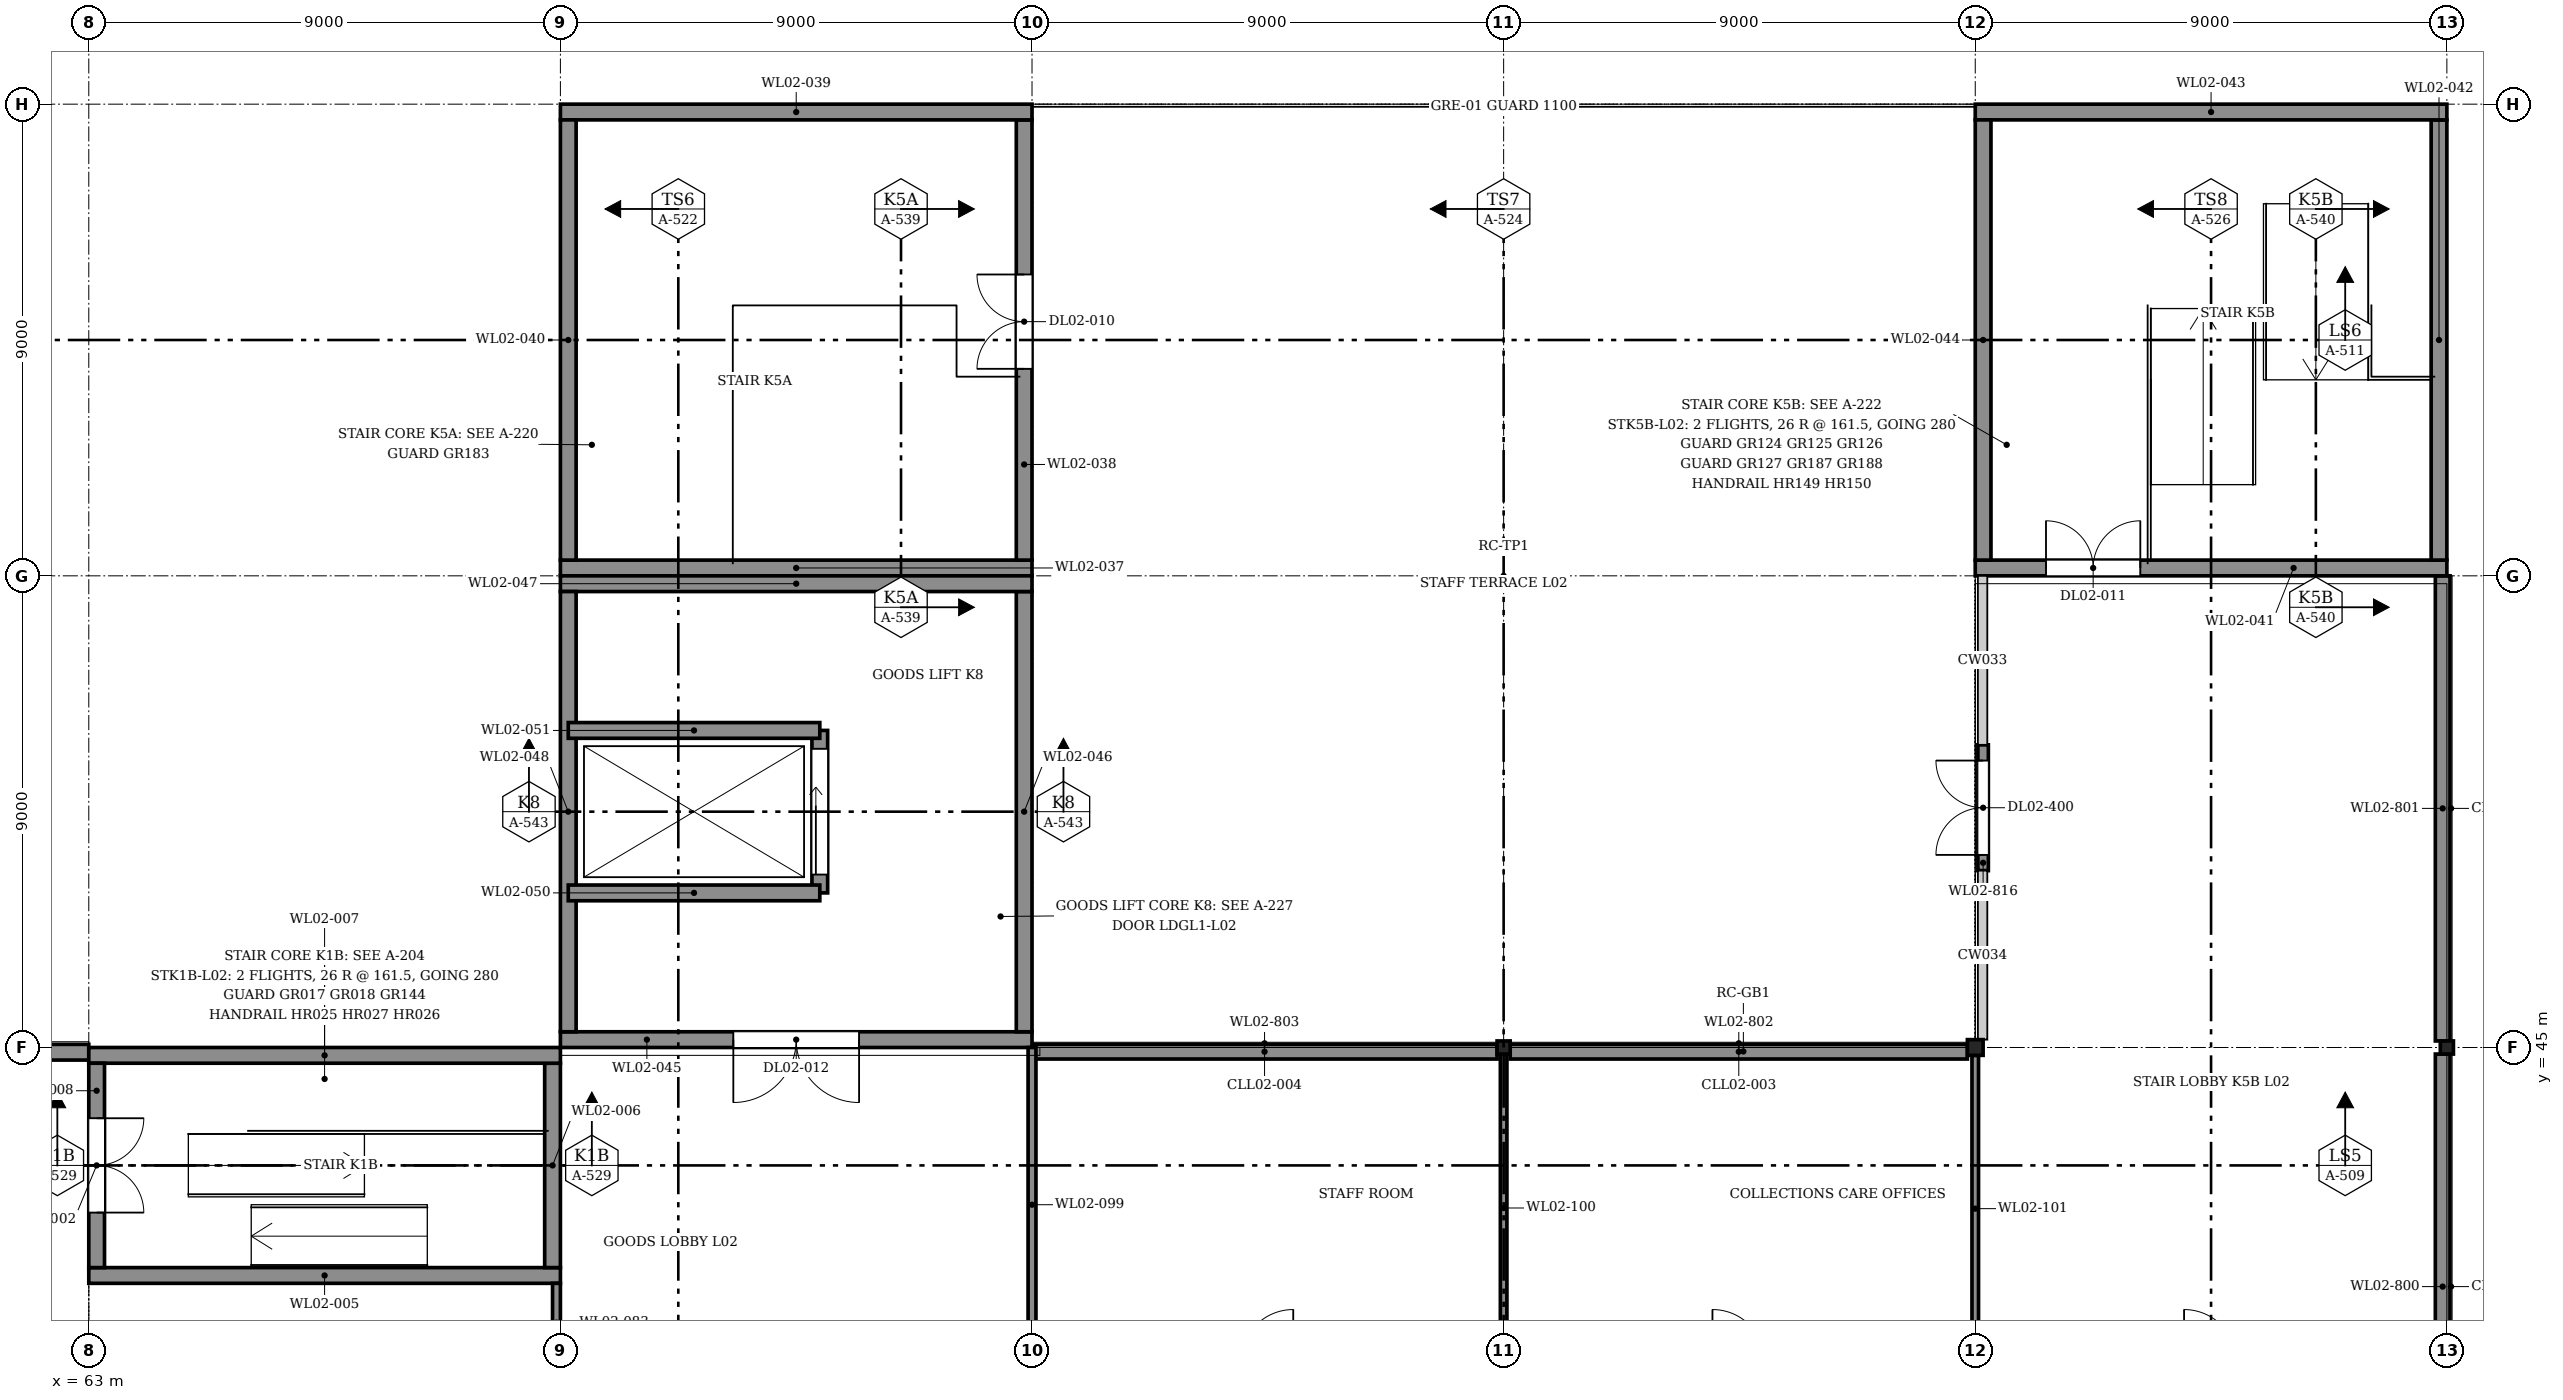
"""IFC4 building model, lengths in metres.
Left out: names, types, materials, properties, quantities, classifications, styles, units other than length and angle.
Written with IfcOpenShell. Run it as: python <this file> out.ifc"""

import sys

from ifc_helpers import new_model, si_unit, direction, frame, frame_2d, origin, origin_2d, place, context, subcontext, project, spatial, rectangle, hollow_rectangle, extrude, element, fill, save


model = new_model("IFC4")
c1 = context("Model", 3, precision=1e-05, world=origin(), true_north=direction((0.0, 1.0)))
c2 = subcontext(c1, "Body", "Model", "MODEL_VIEW")
j1 = project(units=[si_unit("LENGTHUNIT", "METRE"), si_unit("PLANEANGLEUNIT", "RADIAN")], contexts=[c1])
p1 = place(None, origin())
s1 = spatial("IfcSite", under=j1, at=p1, CompositionType="ELEMENT")
p2 = place(p1, origin())
s2 = spatial("IfcBuilding", under=s1, at=p2, CompositionType="ELEMENT")
p3 = place(p2, frame((0.0, 0.0, 9.2)))
s3 = spatial("IfcBuildingStorey", under=s2, at=p3, CompositionType="ELEMENT", Elevation=9.2)
p4 = place(p3, frame((90.0, 45.0, 0.0), z_axis=(0.0, 0.0, 1.0), x_axis=(1.0, 0.0, 0.0)))
e1 = element("IfcColumn", 1, at=p4, inside=s3, PredefinedType="COLUMN", context=c2, shape_type="SweptSolid", body=[
    extrude(hollow_rectangle(XDim=0.25, YDim=0.25, WallThickness=0.01, InnerFilletRadius=0.015, OuterFilletRadius=0.025, at=origin_2d()), origin(), (0.0, 0.0, 1.0), 3.7),
])
p5 = place(p3, frame((99.0, 45.0, 0.0), z_axis=(0.0, 0.0, 1.0), x_axis=(1.0, 0.0, 0.0)))
e2 = element("IfcColumn", 2, at=p5, inside=s3, PredefinedType="COLUMN", context=c2, shape_type="SweptSolid", body=[
    extrude(hollow_rectangle(XDim=0.3, YDim=0.3, WallThickness=0.01, InnerFilletRadius=0.015, OuterFilletRadius=0.025, at=origin_2d()), origin(), (0.0, 0.0, 1.0), 3.7),
])
p6 = place(p3, frame((108.0, 45.0, 0.0), z_axis=(0.0, 0.0, 1.0), x_axis=(1.0, 0.0, 0.0)))
e3 = element("IfcColumn", 3, at=p6, inside=s3, PredefinedType="COLUMN", context=c2, shape_type="SweptSolid", body=[
    extrude(hollow_rectangle(XDim=0.25, YDim=0.25, WallThickness=0.01, InnerFilletRadius=0.015, OuterFilletRadius=0.025, at=origin_2d()), origin(), (0.0, 0.0, 1.0), 3.7),
])
for number, where, z_axis, x_axis in (
    (4, (107.92, 36.0, 0.0), (0.0, 0.0, 1.0), (0.0, 1.0, 0.0)),
    (5, (107.92, 45.125, 0.0), (0.0, 0.0, 1.0), (0.0, 1.0, 0.0)),
):
    element("IfcWall", number, at=place(p3, frame(where, z_axis=z_axis, x_axis=x_axis)), inside=s3, PredefinedType="SOLIDWALL", context=c2, shape_type="SweptSolid", body=[
        extrude(rectangle(XDim=8.875, YDim=0.28, at=frame_2d((4.438, 0.0))), origin(), (0.0, 0.0, 1.0), 2.75),
    ])
p7 = place(p3, frame((90.125, 44.92, 0.0), z_axis=(0.0, 0.0, 1.0), x_axis=(1.0, 0.0, 0.0)))
e6 = element("IfcWall", 6, at=p7, inside=s3, PredefinedType="SOLIDWALL", context=c2, shape_type="SweptSolid", body=[
    extrude(rectangle(XDim=8.725, YDim=0.28, at=frame_2d((4.363, 0.0))), origin(), (0.0, 0.0, 1.0), 2.75),
])
p8 = place(p3, frame((81.0, 44.92, 0.0), z_axis=(0.0, 0.0, 1.0), x_axis=(1.0, 0.0, 0.0)))
e7 = element("IfcWall", 7, at=p8, inside=s3, PredefinedType="SOLIDWALL", context=c2, shape_type="SweptSolid", body=[
    extrude(rectangle(XDim=8.875, YDim=0.28, at=frame_2d((4.438, 0.0))), origin(), (0.0, 0.0, 1.0), 2.75),
])
p9 = place(p3, frame((54.25, 44.91, 0.0), z_axis=(0.0, 0.0, 1.0), x_axis=(1.0, 0.0, 0.0)))
e8 = element("IfcWall", 8, at=p9, inside=s3, PredefinedType="SOLIDWALL", context=c2, shape_type="SweptSolid", body=[
    extrude(rectangle(XDim=8.75, YDim=0.3, at=frame_2d((4.375, 0.0))), origin(), (0.0, 0.0, 1.0), 3.578),
])
p10 = place(p3, frame((99.15, 48.375, 0.0), z_axis=(0.0, 0.0, 1.0), x_axis=(0.0, 1.0, 0.0)))
e9 = element("IfcWall", 9, at=p10, inside=s3, PredefinedType="SOLIDWALL", context=c2, shape_type="SweptSolid", body=[
    extrude(rectangle(XDim=2.4, YDim=0.2, at=frame_2d((1.2, 0.0))), origin(), (0.0, 0.0, 1.0), 3.45),
])
p11 = place(p10, frame((0.3, 0.0, 0.0)))
e10 = element("IfcOpeningElement", 10, at=p11, cuts=e9, PredefinedType="OPENING", context=c2, shape_type="SweptSolid", body=[
    extrude(rectangle(XDim=1.8, YDim=2.4, at=frame_2d((0.9, 1.2))), frame((0.0, 0.11, 0.0), z_axis=(0.0, -1.0, 0.0), x_axis=(1.0, 0.0, 0.0)), (0.0, 0.0, 1.0), 0.22),
])
p12 = place(p3, frame((81.3, 44.875, 3.7), z_axis=(0.0, 0.0, 1.0), x_axis=(1.0, 0.0, 0.0)))
e11 = element("IfcWall", 11, at=p12, inside=s3, PredefinedType="PARAPET", context=c2, shape_type="SweptSolid", body=[
    extrude(rectangle(XDim=17.7, YDim=0.25, at=frame_2d((8.85, 0.0))), origin(), (0.0, 0.0, 1.0), 1.6),
])
for number, where, z_axis, x_axis in (
    (12, (99.125, 45.125, 3.7), (0.0, 0.0, 1.0), (0.0, 1.0, 0.0)),
    (13, (107.875, 45.125, 3.7), (0.0, 0.0, 1.0), (0.0, 1.0, 0.0)),
    (14, (107.875, 36.3, 3.7), (0.0, 0.0, 1.0), (0.0, 1.0, 0.0)),
):
    element("IfcWall", number, at=place(p3, frame(where, z_axis=z_axis, x_axis=x_axis)), inside=s3, PredefinedType="PARAPET", context=c2, shape_type="SweptSolid", body=[
        extrude(rectangle(XDim=8.575, YDim=0.25, at=frame_2d((4.288, 0.0))), origin(), (0.0, 0.0, 1.0), 1.6),
    ])
p13 = place(p3, frame((63.0, 40.65, 0.0), z_axis=(0.0, 0.0, 1.0), x_axis=(1.0, 0.0, 0.0)))
e15 = element("IfcWall", 15, at=p13, inside=s3, PredefinedType="SOLIDWALL", context=c2, shape_type="SweptSolid", body=[
    extrude(rectangle(XDim=9.0, YDim=0.3, at=frame_2d((4.5, 0.0))), origin(), (0.0, 0.0, 1.0), 4.2),
])
p14 = place(p3, frame((71.85, 40.8, 0.0), z_axis=(0.0, 0.0, 1.0), x_axis=(0.0, 1.0, 0.0)))
e16 = element("IfcWall", 16, at=p14, inside=s3, PredefinedType="SOLIDWALL", context=c2, shape_type="SweptSolid", body=[
    extrude(rectangle(XDim=3.9, YDim=0.3, at=frame_2d((1.95, 0.0))), origin(), (0.0, 0.0, 1.0), 4.2),
])
p15 = place(p3, frame((63.0, 44.85, 0.0), z_axis=(0.0, 0.0, 1.0), x_axis=(1.0, 0.0, 0.0)))
e17 = element("IfcWall", 17, at=p15, inside=s3, PredefinedType="SOLIDWALL", context=c2, shape_type="SweptSolid", body=[
    extrude(rectangle(XDim=9.0, YDim=0.3, at=frame_2d((4.5, 0.0))), origin(), (0.0, 0.0, 1.0), 4.2),
])
p16 = place(p3, frame((63.15, 40.8, 0.0), z_axis=(0.0, 0.0, 1.0), x_axis=(0.0, 1.0, 0.0)))
e18 = element("IfcWall", 18, at=p16, inside=s3, PredefinedType="SOLIDWALL", context=c2, shape_type="SweptSolid", body=[
    extrude(rectangle(XDim=3.9, YDim=0.3, at=frame_2d((1.95, 0.0))), origin(), (0.0, 0.0, 1.0), 4.2),
])
p17 = place(p16, frame((1.05, 0.0, 0.0)))
e19 = element("IfcOpeningElement", 19, at=p17, cuts=e18, PredefinedType="OPENING", context=c2, shape_type="SweptSolid", body=[
    extrude(rectangle(XDim=1.8, YDim=2.1, at=frame_2d((0.9, 1.05))), frame((0.0, 0.16, 0.0), z_axis=(0.0, -1.0, 0.0), x_axis=(1.0, 0.0, 0.0)), (0.0, 0.0, 1.0), 0.32),
])
p18 = place(p3, frame((72.0, 54.15, 0.0), z_axis=(0.0, 0.0, 1.0), x_axis=(1.0, 0.0, 0.0)))
e20 = element("IfcWall", 20, at=p18, inside=s3, PredefinedType="SOLIDWALL", context=c2, shape_type="SweptSolid", body=[
    extrude(rectangle(XDim=9.0, YDim=0.3, at=frame_2d((4.5, 0.0))), origin(), (0.0, 0.0, 1.0), 3.7),
])
p19 = place(p3, frame((80.85, 54.3, 0.0), z_axis=(0.0, 0.0, 1.0), x_axis=(0.0, 1.0, 0.0)))
e21 = element("IfcWall", 21, at=p19, inside=s3, PredefinedType="SOLIDWALL", context=c2, shape_type="SweptSolid", body=[
    extrude(rectangle(XDim=8.4, YDim=0.3, at=frame_2d((4.2, 0.0))), origin(), (0.0, 0.0, 1.0), 3.7),
])
p20 = place(p19, frame((3.65, 0.0, 0.0)))
e22 = element("IfcOpeningElement", 22, at=p20, cuts=e21, PredefinedType="OPENING", context=c2, shape_type="SweptSolid", body=[
    extrude(rectangle(XDim=1.8, YDim=2.1, at=frame_2d((0.9, 1.05))), frame((0.0, 0.16, 0.0), z_axis=(0.0, -1.0, 0.0), x_axis=(1.0, 0.0, 0.0)), (0.0, 0.0, 1.0), 0.32),
])
p21 = place(p3, frame((72.0, 62.85, 0.0), z_axis=(0.0, 0.0, 1.0), x_axis=(1.0, 0.0, 0.0)))
e23 = element("IfcWall", 23, at=p21, inside=s3, PredefinedType="SOLIDWALL", context=c2, shape_type="SweptSolid", body=[
    extrude(rectangle(XDim=9.0, YDim=0.3, at=frame_2d((4.5, 0.0))), origin(), (0.0, 0.0, 1.0), 3.7),
])
p22 = place(p3, frame((72.15, 54.3, 0.0), z_axis=(0.0, 0.0, 1.0), x_axis=(0.0, 1.0, 0.0)))
e24 = element("IfcWall", 24, at=p22, inside=s3, PredefinedType="SOLIDWALL", context=c2, shape_type="SweptSolid", body=[
    extrude(rectangle(XDim=8.4, YDim=0.3, at=frame_2d((4.2, 0.0))), origin(), (0.0, 0.0, 1.0), 3.7),
])
p23 = place(p3, frame((99.0, 54.15, 0.0), z_axis=(0.0, 0.0, 1.0), x_axis=(1.0, 0.0, 0.0)))
e25 = element("IfcWall", 25, at=p23, inside=s3, PredefinedType="SOLIDWALL", context=c2, shape_type="SweptSolid", body=[
    extrude(rectangle(XDim=9.0, YDim=0.3, at=frame_2d((4.5, 0.0))), origin(), (0.0, 0.0, 1.0), 4.2),
])
p24 = place(p23, frame((1.35, 0.0, 0.0)))
e26 = element("IfcOpeningElement", 26, at=p24, cuts=e25, PredefinedType="OPENING", context=c2, shape_type="SweptSolid", body=[
    extrude(rectangle(XDim=1.8, YDim=2.1, at=frame_2d((0.9, 1.05))), frame((0.0, 0.16, 0.0), z_axis=(0.0, -1.0, 0.0), x_axis=(1.0, 0.0, 0.0)), (0.0, 0.0, 1.0), 0.32),
])
p25 = place(p3, frame((107.85, 54.3, 0.0), z_axis=(0.0, 0.0, 1.0), x_axis=(0.0, 1.0, 0.0)))
e27 = element("IfcWall", 27, at=p25, inside=s3, PredefinedType="SOLIDWALL", context=c2, shape_type="SweptSolid", body=[
    extrude(rectangle(XDim=8.4, YDim=0.3, at=frame_2d((4.2, 0.0))), origin(), (0.0, 0.0, 1.0), 4.2),
])
p26 = place(p3, frame((99.0, 62.85, 0.0), z_axis=(0.0, 0.0, 1.0), x_axis=(1.0, 0.0, 0.0)))
e28 = element("IfcWall", 28, at=p26, inside=s3, PredefinedType="SOLIDWALL", context=c2, shape_type="SweptSolid", body=[
    extrude(rectangle(XDim=9.0, YDim=0.3, at=frame_2d((4.5, 0.0))), origin(), (0.0, 0.0, 1.0), 4.2),
])
p27 = place(p3, frame((99.15, 54.3, 0.0), z_axis=(0.0, 0.0, 1.0), x_axis=(0.0, 1.0, 0.0)))
e29 = element("IfcWall", 29, at=p27, inside=s3, PredefinedType="SOLIDWALL", context=c2, shape_type="SweptSolid", body=[
    extrude(rectangle(XDim=8.4, YDim=0.3, at=frame_2d((4.2, 0.0))), origin(), (0.0, 0.0, 1.0), 4.2),
])
p28 = place(p3, frame((72.0, 45.15, 0.0), z_axis=(0.0, 0.0, 1.0), x_axis=(1.0, 0.0, 0.0)))
e30 = element("IfcWall", 30, at=p28, inside=s3, PredefinedType="SOLIDWALL", context=c2, shape_type="SweptSolid", body=[
    extrude(rectangle(XDim=9.0, YDim=0.3, at=frame_2d((4.5, 0.0))), origin(), (0.0, 0.0, 1.0), 4.2),
])
p29 = place(p28, frame((3.3, 0.0, 0.0)))
e31 = element("IfcOpeningElement", 31, at=p29, cuts=e30, PredefinedType="OPENING", context=c2, shape_type="SweptSolid", body=[
    extrude(rectangle(XDim=2.4, YDim=2.4, at=frame_2d((1.2, 1.2))), frame((0.0, 0.16, 0.0), z_axis=(0.0, -1.0, 0.0), x_axis=(1.0, 0.0, 0.0)), (0.0, 0.0, 1.0), 0.32),
])
p30 = place(p3, frame((80.85, 45.3, 0.0), z_axis=(0.0, 0.0, 1.0), x_axis=(0.0, 1.0, 0.0)))
e32 = element("IfcWall", 32, at=p30, inside=s3, PredefinedType="SOLIDWALL", context=c2, shape_type="SweptSolid", body=[
    extrude(rectangle(XDim=8.4, YDim=0.3, at=frame_2d((4.2, 0.0))), origin(), (0.0, 0.0, 1.0), 4.2),
])
p31 = place(p3, frame((72.0, 53.85, 0.0), z_axis=(0.0, 0.0, 1.0), x_axis=(1.0, 0.0, 0.0)))
e33 = element("IfcWall", 33, at=p31, inside=s3, PredefinedType="SOLIDWALL", context=c2, shape_type="SweptSolid", body=[
    extrude(rectangle(XDim=9.0, YDim=0.3, at=frame_2d((4.5, 0.0))), origin(), (0.0, 0.0, 1.0), 4.2),
])
p32 = place(p3, frame((72.15, 45.3, 0.0), z_axis=(0.0, 0.0, 1.0), x_axis=(0.0, 1.0, 0.0)))
e34 = element("IfcWall", 34, at=p32, inside=s3, PredefinedType="SOLIDWALL", context=c2, shape_type="SweptSolid", body=[
    extrude(rectangle(XDim=8.4, YDim=0.3, at=frame_2d((4.2, 0.0))), origin(), (0.0, 0.0, 1.0), 4.2),
])
p33 = place(p3, frame((76.95, 47.95, 0.0), z_axis=(0.0, 0.0, 1.0), x_axis=(0.0, 1.0, 0.0)))
e35 = element("IfcWall", 35, at=p33, inside=s3, PredefinedType="SOLIDWALL", context=c2, shape_type="SweptSolid", body=[
    extrude(rectangle(XDim=3.1, YDim=0.3, at=frame_2d((1.55, 0.0))), origin(), (0.0, 0.0, 1.0), 4.2),
])
p34 = place(p33, frame((0.35, 0.0, 0.0)))
e36 = element("IfcOpeningElement", 36, at=p34, cuts=e35, PredefinedType="OPENING", context=c2, shape_type="SweptSolid", body=[
    extrude(rectangle(XDim=2.4, YDim=2.4, at=frame_2d((1.2, 1.2))), frame((0.0, 0.16, 0.0), z_axis=(0.0, -1.0, 0.0), x_axis=(1.0, 0.0, 0.0)), (0.0, 0.0, 1.0), 0.32),
])
for number, where, z_axis, x_axis in (
    (37, (72.15, 47.95, 0.0), (0.0, 0.0, 1.0), (1.0, 0.0, 0.0)),
    (38, (72.15, 51.05, 0.0), (0.0, 0.0, 1.0), (1.0, 0.0, 0.0)),
):
    element("IfcWall", number, at=place(p3, frame(where, z_axis=z_axis, x_axis=x_axis)), inside=s3, PredefinedType="SOLIDWALL", context=c2, shape_type="SweptSolid", body=[
        extrude(rectangle(XDim=4.8, YDim=0.3, at=frame_2d((2.4, 0.0))), origin(), (0.0, 0.0, 1.0), 4.2),
    ])
p35 = place(p3, frame((71.925, 39.0, 0.0), z_axis=(0.0, 0.0, 1.0), x_axis=(0.0, 1.0, 0.0)))
e39 = element("IfcWall", 39, at=p35, inside=s3, PredefinedType="PARTITIONING", context=c2, shape_type="SweptSolid", body=[
    extrude(rectangle(XDim=1.5, YDim=0.15, at=frame_2d((0.75, 0.0))), origin(), (0.0, 0.0, 1.0), 3.035),
])
p36 = place(p3, frame((81.0, 39.0, 0.0), z_axis=(0.0, 0.0, 1.0), x_axis=(0.0, 1.0, 0.0)))
e40 = element("IfcWall", 40, at=p36, inside=s3, PredefinedType="PARTITIONING", context=c2, shape_type="SweptSolid", body=[
    extrude(rectangle(XDim=6.0, YDim=0.15, at=frame_2d((3.0, 0.0))), origin(), (0.0, 0.0, 1.0), 2.658),
])
p37 = place(p3, frame((90.0, 39.0, 0.0), z_axis=(0.0, 0.0, 1.0), x_axis=(0.0, 1.0, 0.0)))
e41 = element("IfcWall", 41, at=p37, inside=s3, PredefinedType="PARTITIONING", context=c2, shape_type="SweptSolid", body=[
    extrude(rectangle(XDim=5.875, YDim=0.125, at=frame_2d((2.938, 0.0))), origin(), (0.0, 0.0, 1.0), 2.658),
])
p38 = place(p3, frame((99.0, 39.0, 0.0), z_axis=(0.0, 0.0, 1.0), x_axis=(0.0, 1.0, 0.0)))
e42 = element("IfcWall", 42, at=p38, inside=s3, PredefinedType="PARTITIONING", context=c2, shape_type="SweptSolid", body=[
    extrude(rectangle(XDim=5.85, YDim=0.125, at=frame_2d((2.925, 0.0))), origin(), (0.0, 0.0, 1.0), 2.658),
])
p39 = place(p11, origin())
e43 = element("IfcDoor", 43, at=p39, inside=s3, OperationType="DOUBLE_DOOR_SINGLE_SWING", PredefinedType="DOOR", context=c2, shape_type="SweptSolid", body=[
    extrude(rectangle(XDim=1.8, YDim=2.4, at=frame_2d((0.9, 1.2))), frame((0.0, 0.025, 0.0), z_axis=(0.0, -1.0, 0.0), x_axis=(1.0, 0.0, 0.0)), (0.0, 0.0, 1.0), 0.05),
])
fill(e10, e43)
p40 = place(p17, frame((1.8, 0.0, 0.0), z_axis=(0.0, 0.0, 1.0), x_axis=(-1.0, 0.0, 0.0)))
e44 = element("IfcDoor", 44, at=p40, inside=s3, OperationType="DOUBLE_DOOR_SINGLE_SWING", PredefinedType="DOOR", context=c2, shape_type="SweptSolid", body=[
    extrude(rectangle(XDim=1.8, YDim=2.1, at=frame_2d((0.9, 1.05))), frame((0.0, 0.025, 0.0), z_axis=(0.0, -1.0, 0.0), x_axis=(1.0, 0.0, 0.0)), (0.0, 0.0, 1.0), 0.05),
])
fill(e19, e44)
p41 = place(p20, origin())
e45 = element("IfcDoor", 45, at=p41, inside=s3, OperationType="DOUBLE_DOOR_SINGLE_SWING", PredefinedType="DOOR", context=c2, shape_type="SweptSolid", body=[
    extrude(rectangle(XDim=1.8, YDim=2.1, at=frame_2d((0.9, 1.05))), frame((0.0, 0.025, 0.0), z_axis=(0.0, -1.0, 0.0), x_axis=(1.0, 0.0, 0.0)), (0.0, 0.0, 1.0), 0.05),
])
fill(e22, e45)
p42 = place(p24, origin())
e46 = element("IfcDoor", 46, at=p42, inside=s3, OperationType="DOUBLE_DOOR_SINGLE_SWING", PredefinedType="DOOR", context=c2, shape_type="SweptSolid", body=[
    extrude(rectangle(XDim=1.8, YDim=2.1, at=frame_2d((0.9, 1.05))), frame((0.0, 0.025, 0.0), z_axis=(0.0, -1.0, 0.0), x_axis=(1.0, 0.0, 0.0)), (0.0, 0.0, 1.0), 0.05),
])
fill(e26, e46)
p43 = place(p34, origin())
e47 = element("IfcDoor", 47, at=p43, inside=s3, OperationType="DOUBLE_DOOR_SLIDING", PredefinedType="DOOR", context=c2, shape_type="SweptSolid", body=[
    extrude(rectangle(XDim=2.4, YDim=2.4, at=frame_2d((1.2, 1.2))), frame((0.0, 0.025, 0.0), z_axis=(0.0, -1.0, 0.0), x_axis=(1.0, 0.0, 0.0)), (0.0, 0.0, 1.0), 0.05),
])
fill(e36, e47)
p44 = place(p29, frame((2.4, 0.0, 0.0), z_axis=(0.0, 0.0, 1.0), x_axis=(-1.0, 0.0, 0.0)))
e48 = element("IfcDoor", 48, at=p44, inside=s3, OperationType="DOUBLE_DOOR_SINGLE_SWING", PredefinedType="DOOR", context=c2, shape_type="SweptSolid", body=[
    extrude(rectangle(XDim=2.4, YDim=2.4, at=frame_2d((1.2, 1.2))), frame((0.0, 0.025, 0.0), z_axis=(0.0, -1.0, 0.0), x_axis=(1.0, 0.0, 0.0)), (0.0, 0.0, 1.0), 0.05),
])
fill(e31, e48)
save(model, sys.argv[1])
